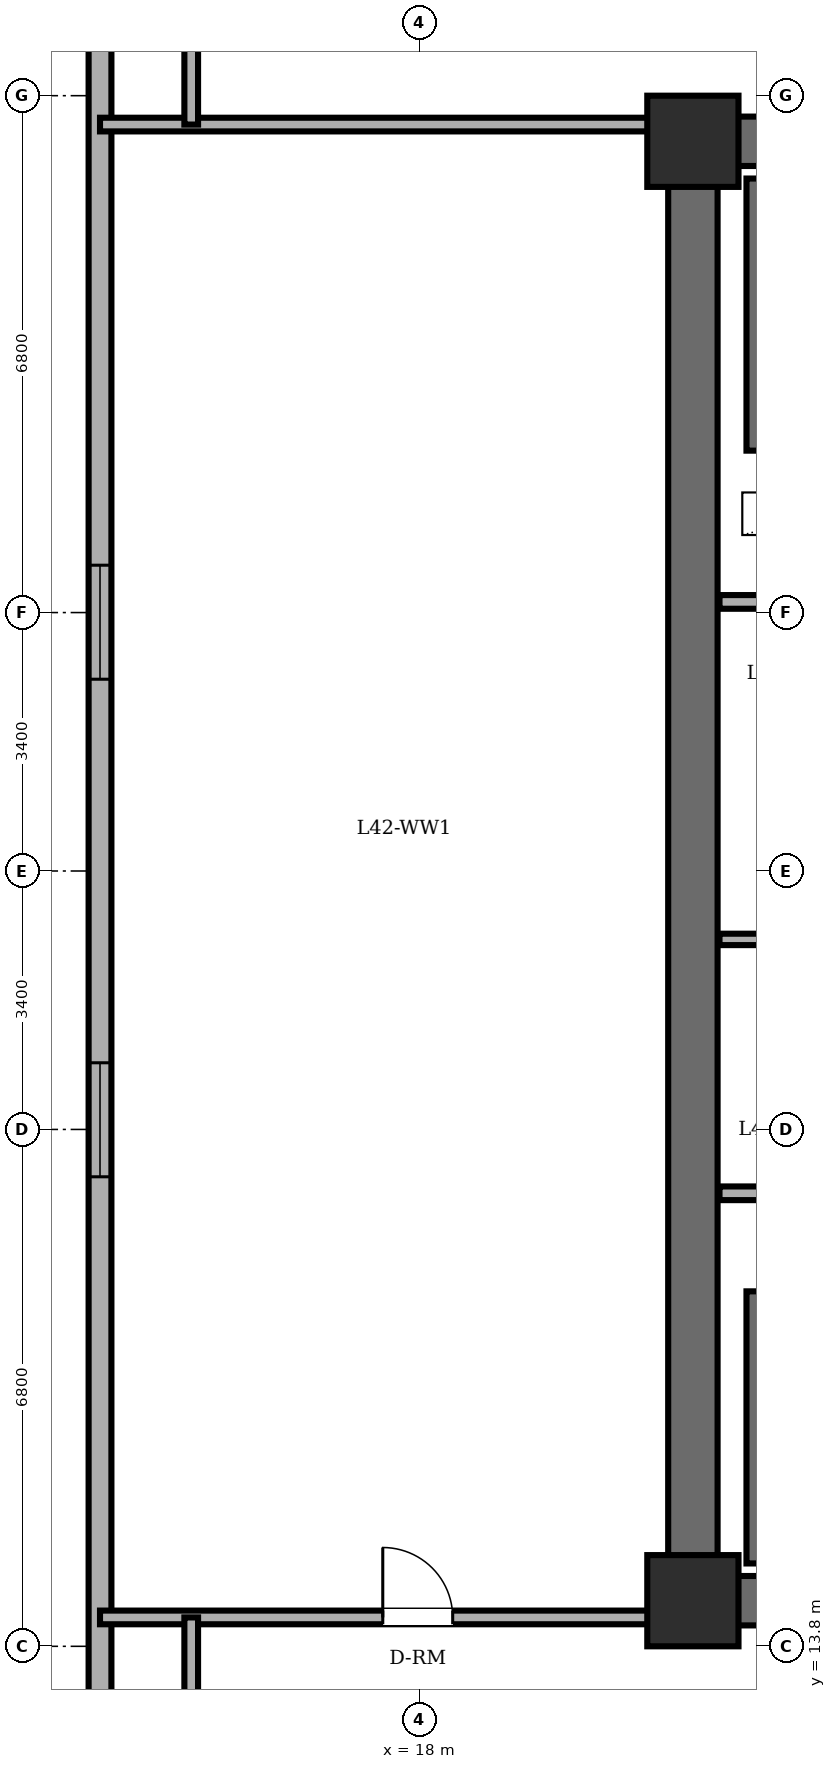
"""IFC4 building model, lengths in metres.
Left out: names, types, materials, properties, quantities, classifications, styles, units other than length and angle.
Written with IfcOpenShell. Run it as: python <this file> out.ifc"""

import sys

from ifc_helpers import new_model, si_unit, direction, frame, frame_2d, origin, origin_2d, place, context, subcontext, project, spatial, rectangle, extrude, element, fill, save


model = new_model("IFC4")
c1 = context("Model", 3, precision=1e-05, world=origin(), true_north=direction((0.0, 1.0)))
c2 = subcontext(c1, "Body", "Model", "MODEL_VIEW")
j1 = project(units=[si_unit("LENGTHUNIT", "METRE"), si_unit("PLANEANGLEUNIT", "RADIAN")], contexts=[c1])
p1 = place(None, origin())
s1 = spatial("IfcSite", under=j1, at=p1, CompositionType="ELEMENT")
p2 = place(p1, origin())
s2 = spatial("IfcBuilding", under=s1, at=p2, CompositionType="ELEMENT")
p3 = place(p2, frame((0.0, 0.0, 161.8)))
s3 = spatial("IfcBuildingStorey", under=s2, at=p3, CompositionType="ELEMENT", Elevation=161.8)
for number, where, z_axis, x_axis in (
    (1, (21.6, 14.4, 0.0), (0.0, 0.0, 1.0), (1.0, 0.0, 0.0)),
    (2, (21.6, 33.6, 0.0), (0.0, 0.0, 1.0), (1.0, 0.0, 0.0)),
):
    element("IfcColumn", number, at=place(p3, frame(where, z_axis=z_axis, x_axis=x_axis)), inside=s3, PredefinedType="COLUMN", context=c2, shape_type="SweptSolid", body=[
        extrude(rectangle(XDim=1.2, YDim=1.2, at=origin_2d()), origin(), (0.0, 0.0, 1.0), 3.6),
    ])
p4 = place(p3, frame((13.8, 36.3, 0.0), z_axis=(0.0, 0.0, 1.0), x_axis=(0.0, -1.0, 0.0)))
e3 = element("IfcWall", 3, at=p4, inside=s3, PredefinedType="SOLIDWALL", context=c2, shape_type="SweptSolid", body=[
    extrude(rectangle(XDim=24.6, YDim=0.3, at=frame_2d((12.3, 0.0))), origin(), (0.0, 0.0, 1.0), 3.4),
])
p5 = place(p4, frame((8.277, 0.0, 0.85)))
e4 = element("IfcOpeningElement", 4, at=p5, cuts=e3, PredefinedType="OPENING", context=c2, shape_type="SweptSolid", body=[
    extrude(rectangle(XDim=1.5, YDim=1.55, at=frame_2d((0.75, 0.775))), frame((0.0, 0.16, 0.0), z_axis=(0.0, -1.0, 0.0), x_axis=(1.0, 0.0, 0.0)), (0.0, 0.0, 1.0), 0.32),
])
p6 = place(p4, frame((14.823, 0.0, 0.85)))
e5 = element("IfcOpeningElement", 5, at=p6, cuts=e3, PredefinedType="OPENING", context=c2, shape_type="SweptSolid", body=[
    extrude(rectangle(XDim=1.5, YDim=1.55, at=frame_2d((0.75, 0.775))), frame((0.0, 0.16, 0.0), z_axis=(0.0, -1.0, 0.0), x_axis=(1.0, 0.0, 0.0)), (0.0, 0.0, 1.0), 0.32),
])
p7 = place(p3, frame((21.6, 14.4, 0.0), z_axis=(0.0, 0.0, 1.0), x_axis=(0.0, 1.0, 0.0)))
e6 = element("IfcWall", 6, at=p7, inside=s3, PredefinedType="SHEAR", context=c2, shape_type="SweptSolid", body=[
    extrude(rectangle(XDim=19.2, YDim=0.65, at=frame_2d((9.6, 0.0))), origin(), (0.0, 0.0, 1.0), 3.4),
])
for number, where, z_axis, x_axis in (
    (7, (21.6, 33.6, 0.0), (0.0, 0.0, 1.0), (1.0, 0.0, 0.0)),
    (8, (37.2, 14.4, 0.0), (0.0, 0.0, 1.0), (-1.0, 0.0, 0.0)),
):
    element("IfcWall", number, at=place(p3, frame(where, z_axis=z_axis, x_axis=x_axis)), inside=s3, PredefinedType="SHEAR", context=c2, shape_type="SweptSolid", body=[
        extrude(rectangle(XDim=15.6, YDim=0.65, at=frame_2d((7.8, 0.0))), origin(), (0.0, 0.0, 1.0), 3.4),
    ])
for number, where, z_axis, x_axis in (
    (9, (22.48, 29.53, 0.0), (0.0, 0.0, 1.0), (0.0, 1.0, 0.0)),
    (10, (22.48, 14.89, 0.0), (0.0, 0.0, 1.0), (0.0, 1.0, 0.0)),
):
    element("IfcWall", number, at=place(p3, frame(where, z_axis=z_axis, x_axis=x_axis)), inside=s3, PredefinedType="SOLIDWALL", context=c2, shape_type="SweptSolid", body=[
        extrude(rectangle(XDim=3.58, YDim=0.35, at=frame_2d((1.79, 0.0))), origin(), (0.0, 0.0, 1.0), 3.4),
    ])
p8 = place(p3, frame((21.95, 27.54, 0.0), z_axis=(0.0, 0.0, 1.0), x_axis=(1.0, 0.0, 0.0)))
e11 = element("IfcWall", 11, at=p8, inside=s3, PredefinedType="PARTITIONING", context=c2, shape_type="SweptSolid", body=[
    extrude(rectangle(XDim=10.56, YDim=0.18, at=frame_2d((5.28, 0.0))), origin(), (0.0, 0.0, 1.0), 3.4),
])
p9 = place(p3, frame((21.95, 19.76, 0.0), z_axis=(0.0, 0.0, 1.0), x_axis=(1.0, 0.0, 0.0)))
e12 = element("IfcWall", 12, at=p9, inside=s3, PredefinedType="PARTITIONING", context=c2, shape_type="SweptSolid", body=[
    extrude(rectangle(XDim=14.87, YDim=0.18, at=frame_2d((7.435, 0.0))), origin(), (0.0, 0.0, 1.0), 3.4),
])
p10 = place(p3, frame((21.95, 23.1, 0.0), z_axis=(0.0, 0.0, 1.0), x_axis=(1.0, 0.0, 0.0)))
e13 = element("IfcWall", 13, at=p10, inside=s3, PredefinedType="PARTITIONING", context=c2, shape_type="SweptSolid", body=[
    extrude(rectangle(XDim=2.51, YDim=0.15, at=frame_2d((1.255, 0.0))), origin(), (0.0, 0.0, 1.0), 3.4),
])
p11 = place(p3, frame((13.8, 14.18, 0.0), z_axis=(0.0, 0.0, 1.0), x_axis=(1.0, 0.0, 0.0)))
e14 = element("IfcWall", 14, at=p11, inside=s3, PredefinedType="PARTITIONING", context=c2, shape_type="SweptSolid", body=[
    extrude(rectangle(XDim=7.68, YDim=0.18, at=frame_2d((3.84, 0.0))), origin(), (0.0, 0.0, 1.0), 3.4),
])
p12 = place(p11, frame((3.72, 0.0, 0.0)))
e15 = element("IfcOpeningElement", 15, at=p12, cuts=e14, PredefinedType="OPENING", context=c2, shape_type="SweptSolid", body=[
    extrude(rectangle(XDim=0.92, YDim=2.1, at=frame_2d((0.46, 1.05))), frame((0.0, 0.1, 0.0), z_axis=(0.0, -1.0, 0.0), x_axis=(1.0, 0.0, 0.0)), (0.0, 0.0, 1.0), 0.2),
])
p13 = place(p3, frame((13.8, 33.82, 0.0), z_axis=(0.0, 0.0, 1.0), x_axis=(1.0, 0.0, 0.0)))
e16 = element("IfcWall", 16, at=p13, inside=s3, PredefinedType="PARTITIONING", context=c2, shape_type="SweptSolid", body=[
    extrude(rectangle(XDim=7.68, YDim=0.18, at=frame_2d((3.84, 0.0))), origin(), (0.0, 0.0, 1.0), 3.4),
])
for number, where, z_axis, x_axis in (
    (17, (15.0, 8.487, 0.0), (0.0, 0.0, 1.0), (0.0, 1.0, 0.0)),
    (18, (15.0, 33.82, 0.0), (0.0, 0.0, 1.0), (0.0, 1.0, 0.0)),
):
    element("IfcWall", number, at=place(p3, frame(where, z_axis=z_axis, x_axis=x_axis)), inside=s3, PredefinedType="PARTITIONING", context=c2, shape_type="SweptSolid", body=[
        extrude(rectangle(XDim=5.693, YDim=0.18, at=frame_2d((2.846, 0.0))), origin(), (0.0, 0.0, 1.0), 3.4),
    ])
p14 = place(p5, origin())
e19 = element("IfcWindow", 19, at=p14, inside=s3, PartitioningType="DOUBLE_PANEL_VERTICAL", PredefinedType="WINDOW", context=c2, shape_type="SweptSolid", body=[
    extrude(rectangle(XDim=1.5, YDim=1.55, at=frame_2d((0.75, 0.775))), frame((0.0, 0.03, 0.0), z_axis=(0.0, -1.0, 0.0), x_axis=(1.0, 0.0, 0.0)), (0.0, 0.0, 1.0), 0.06),
])
fill(e4, e19)
p15 = place(p6, origin())
e20 = element("IfcWindow", 20, at=p15, inside=s3, PartitioningType="DOUBLE_PANEL_VERTICAL", PredefinedType="WINDOW", context=c2, shape_type="SweptSolid", body=[
    extrude(rectangle(XDim=1.5, YDim=1.55, at=frame_2d((0.75, 0.775))), frame((0.0, 0.03, 0.0), z_axis=(0.0, -1.0, 0.0), x_axis=(1.0, 0.0, 0.0)), (0.0, 0.0, 1.0), 0.06),
])
fill(e5, e20)
p16 = place(p12, origin())
e21 = element("IfcDoor", 21, at=p16, inside=s3, OperationType="SINGLE_SWING_LEFT", PredefinedType="DOOR", context=c2, shape_type="SweptSolid", body=[
    extrude(rectangle(XDim=0.92, YDim=2.1, at=frame_2d((0.46, 1.05))), frame((0.0, 0.025, 0.0), z_axis=(0.0, -1.0, 0.0), x_axis=(1.0, 0.0, 0.0)), (0.0, 0.0, 1.0), 0.05),
])
fill(e15, e21)
save(model, sys.argv[1])
